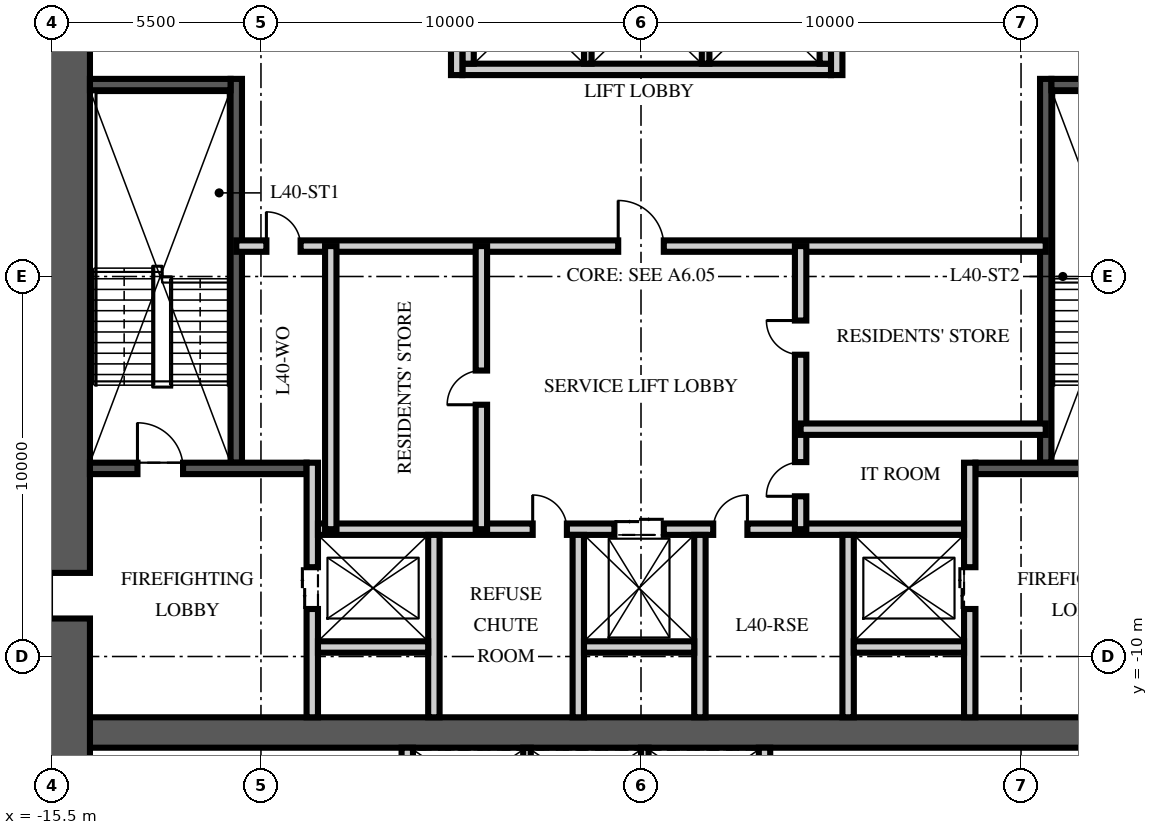
"""IFC4 building model, lengths in metres.
Left out: names, types, materials, properties, quantities, classifications, styles, units other than length and angle.
Written with IfcOpenShell. Run it as: python <this file> out.ifc"""

import sys

from ifc_helpers import new_model, si_unit, direction, frame, frame_2d, origin, place, context, subcontext, project, spatial, rectangle, extrude, element, fill, save


model = new_model("IFC4")
c1 = context("Model", 3, precision=1e-05, world=origin(), true_north=direction((0.0, 1.0)))
c2 = subcontext(c1, "Body", "Model", "MODEL_VIEW")
j1 = project(units=[si_unit("LENGTHUNIT", "METRE"), si_unit("PLANEANGLEUNIT", "RADIAN")], contexts=[c1])
p1 = place(None, origin())
s1 = spatial("IfcSite", under=j1, at=p1, CompositionType="ELEMENT")
p2 = place(p1, origin())
s2 = spatial("IfcBuilding", under=s1, at=p2, CompositionType="ELEMENT")
p3 = place(p2, frame((0.0, 0.0, 159.75)))
s3 = spatial("IfcBuildingStorey", under=s2, at=p3, CompositionType="ELEMENT", Elevation=159.75)
p4 = place(p3, frame((-15.5, -12.0, -0.25), z_axis=(0.0, 0.0, 1.0), x_axis=(1.0, 0.0, 0.0)))
e1 = element("IfcWall", 1, at=p4, inside=s3, PredefinedType="SHEAR", context=c2, shape_type="SweptSolid", body=[
    extrude(rectangle(XDim=31.0, YDim=0.8, at=frame_2d((15.5, 0.0))), origin(), (0.0, 0.0, 1.0), 3.75),
])
p5 = place(p3, frame((-15.5, -15.5, -0.25), z_axis=(0.0, 0.0, 1.0), x_axis=(0.0, 1.0, 0.0)))
e2 = element("IfcWall", 2, at=p5, inside=s3, PredefinedType="SHEAR", context=c2, shape_type="SweptSolid", body=[
    extrude(rectangle(XDim=31.0, YDim=2.0, at=frame_2d((15.5, 0.0))), origin(), (0.0, 0.0, 1.0), 3.75),
])
p6 = place(p5, frame((6.5, 0.0, 0.25)))
e3 = element("IfcOpeningElement", 3, at=p6, cuts=e2, PredefinedType="OPENING", context=c2, shape_type="SweptSolid", body=[
    extrude(rectangle(XDim=1.2, YDim=2.1, at=frame_2d((0.6, 1.05))), frame((0.0, 1.01, 0.0), z_axis=(0.0, -1.0, 0.0), x_axis=(1.0, 0.0, 0.0)), (0.0, 0.0, 1.0), 2.02),
])
p7 = place(p5, frame((23.0, 0.0, 0.25)))
e4 = element("IfcOpeningElement", 4, at=p7, cuts=e2, PredefinedType="OPENING", context=c2, shape_type="SweptSolid", body=[
    extrude(rectangle(XDim=1.8, YDim=2.1, at=frame_2d((0.9, 1.05))), frame((0.0, 1.01, 0.0), z_axis=(0.0, -1.0, 0.0), x_axis=(1.0, 0.0, 0.0)), (0.0, 0.0, 1.0), 2.02),
])
p8 = place(p3, frame((-10.65, -4.9, 0.0), z_axis=(0.0, 0.0, 1.0), x_axis=(0.0, 1.0, 0.0)))
e5 = element("IfcWall", 5, at=p8, inside=s3, PredefinedType="SOLIDWALL", context=c2, shape_type="SweptSolid", body=[
    extrude(rectangle(XDim=10.1, YDim=0.3, at=frame_2d((5.05, 0.0))), origin(), (0.0, 0.0, 1.0), 3.5),
])
p9 = place(p3, frame((-14.5, -5.05, 0.0), z_axis=(0.0, 0.0, 1.0), x_axis=(1.0, 0.0, 0.0)))
e6 = element("IfcWall", 6, at=p9, inside=s3, PredefinedType="SOLIDWALL", context=c2, shape_type="SweptSolid", body=[
    extrude(rectangle(XDim=5.7, YDim=0.3, at=frame_2d((2.85, 0.0))), origin(), (0.0, 0.0, 1.0), 3.5),
])
p10 = place(p9, frame((1.25, 0.0, 0.0)))
e7 = element("IfcOpeningElement", 7, at=p10, cuts=e6, PredefinedType="OPENING", context=c2, shape_type="SweptSolid", body=[
    extrude(rectangle(XDim=1.2, YDim=2.1, at=frame_2d((0.6, 1.05))), frame((0.0, 0.16, 0.0), z_axis=(0.0, -1.0, 0.0), x_axis=(1.0, 0.0, 0.0)), (0.0, 0.0, 1.0), 0.32),
])
p11 = place(p3, frame((-14.5, 5.05, 0.0), z_axis=(0.0, 0.0, 1.0), x_axis=(1.0, 0.0, 0.0)))
e8 = element("IfcWall", 8, at=p11, inside=s3, PredefinedType="SOLIDWALL", context=c2, shape_type="SweptSolid", body=[
    extrude(rectangle(XDim=3.7, YDim=0.3, at=frame_2d((1.85, 0.0))), origin(), (0.0, 0.0, 1.0), 3.5),
])
p12 = place(p3, frame((-8.65, -11.6, 0.0), z_axis=(0.0, 0.0, 1.0), x_axis=(0.0, 1.0, 0.0)))
e9 = element("IfcWall", 9, at=p12, inside=s3, PredefinedType="PARTITIONING", context=c2, shape_type="SweptSolid", body=[
    extrude(rectangle(XDim=6.7, YDim=0.3, at=frame_2d((3.35, 0.0))), origin(), (0.0, 0.0, 1.0), 3.5),
])
p13 = place(p12, frame((2.85, 0.0, 0.0)))
e10 = element("IfcOpeningElement", 10, at=p13, cuts=e9, PredefinedType="OPENING", context=c2, shape_type="SweptSolid", body=[
    extrude(rectangle(XDim=1.1, YDim=2.1, at=frame_2d((0.55, 1.05))), frame((0.0, 0.16, 0.0), z_axis=(0.0, -1.0, 0.0), x_axis=(1.0, 0.0, 0.0)), (0.0, 0.0, 1.0), 0.32),
])
p14 = place(p3, frame((10.65, -4.9, 0.0), z_axis=(0.0, 0.0, 1.0), x_axis=(0.0, 1.0, 0.0)))
e11 = element("IfcWall", 11, at=p14, inside=s3, PredefinedType="SOLIDWALL", context=c2, shape_type="SweptSolid", body=[
    extrude(rectangle(XDim=10.1, YDim=0.3, at=frame_2d((5.05, 0.0))), origin(), (0.0, 0.0, 1.0), 3.5),
])
p15 = place(p3, frame((14.5, -5.05, 0.0), z_axis=(0.0, 0.0, 1.0), x_axis=(-1.0, 0.0, 0.0)))
e12 = element("IfcWall", 12, at=p15, inside=s3, PredefinedType="SOLIDWALL", context=c2, shape_type="SweptSolid", body=[
    extrude(rectangle(XDim=5.7, YDim=0.3, at=frame_2d((2.85, 0.0))), origin(), (0.0, 0.0, 1.0), 3.5),
])
p16 = place(p15, frame((1.25, 0.0, 0.0)))
e13 = element("IfcOpeningElement", 13, at=p16, cuts=e12, PredefinedType="OPENING", context=c2, shape_type="SweptSolid", body=[
    extrude(rectangle(XDim=1.2, YDim=2.1, at=frame_2d((0.6, 1.05))), frame((0.0, 0.16, 0.0), z_axis=(0.0, -1.0, 0.0), x_axis=(1.0, 0.0, 0.0)), (0.0, 0.0, 1.0), 0.32),
])
p17 = place(p3, frame((14.5, 5.05, 0.0), z_axis=(0.0, 0.0, 1.0), x_axis=(-1.0, 0.0, 0.0)))
e14 = element("IfcWall", 14, at=p17, inside=s3, PredefinedType="SOLIDWALL", context=c2, shape_type="SweptSolid", body=[
    extrude(rectangle(XDim=3.7, YDim=0.3, at=frame_2d((1.85, 0.0))), origin(), (0.0, 0.0, 1.0), 3.5),
])
p18 = place(p3, frame((8.65, -11.6, 0.0), z_axis=(0.0, 0.0, 1.0), x_axis=(0.0, 1.0, 0.0)))
e15 = element("IfcWall", 15, at=p18, inside=s3, PredefinedType="PARTITIONING", context=c2, shape_type="SweptSolid", body=[
    extrude(rectangle(XDim=6.7, YDim=0.3, at=frame_2d((3.35, 0.0))), origin(), (0.0, 0.0, 1.0), 3.5),
])
p19 = place(p18, frame((2.85, 0.0, 0.0)))
e16 = element("IfcOpeningElement", 16, at=p19, cuts=e15, PredefinedType="OPENING", context=c2, shape_type="SweptSolid", body=[
    extrude(rectangle(XDim=1.1, YDim=2.1, at=frame_2d((0.55, 1.05))), frame((0.0, 0.16, 0.0), z_axis=(0.0, -1.0, 0.0), x_axis=(1.0, 0.0, 0.0)), (0.0, 0.0, 1.0), 0.32),
])
p20 = place(p3, frame((-8.5, -6.65, 0.0), z_axis=(0.0, 0.0, 1.0), x_axis=(1.0, 0.0, 0.0)))
e17 = element("IfcWall", 17, at=p20, inside=s3, PredefinedType="PARTITIONING", context=c2, shape_type="SweptSolid", body=[
    extrude(rectangle(XDim=17.0, YDim=0.3, at=frame_2d((8.5, 0.0))), origin(), (0.0, 0.0, 1.0), 3.5),
])
p21 = place(p20, frame((7.8, 0.0, 0.0)))
e18 = element("IfcOpeningElement", 18, at=p21, cuts=e17, PredefinedType="OPENING", context=c2, shape_type="SweptSolid", body=[
    extrude(rectangle(XDim=1.3, YDim=2.4, at=frame_2d((0.65, 1.2))), frame((0.0, 0.16, 0.0), z_axis=(0.0, -1.0, 0.0), x_axis=(1.0, 0.0, 0.0)), (0.0, 0.0, 1.0), 0.32),
])
p22 = place(p20, frame((5.65, 0.0, 0.0)))
e19 = element("IfcOpeningElement", 19, at=p22, cuts=e17, PredefinedType="OPENING", context=c2, shape_type="SweptSolid", body=[
    extrude(rectangle(XDim=0.9, YDim=2.1, at=frame_2d((0.45, 1.05))), frame((0.0, 0.16, 0.0), z_axis=(0.0, -1.0, 0.0), x_axis=(1.0, 0.0, 0.0)), (0.0, 0.0, 1.0), 0.32),
])
p23 = place(p20, frame((10.4, 0.0, 0.0)))
e20 = element("IfcOpeningElement", 20, at=p23, cuts=e17, PredefinedType="OPENING", context=c2, shape_type="SweptSolid", body=[
    extrude(rectangle(XDim=0.9, YDim=2.1, at=frame_2d((0.45, 1.05))), frame((0.0, 0.16, 0.0), z_axis=(0.0, -1.0, 0.0), x_axis=(1.0, 0.0, 0.0)), (0.0, 0.0, 1.0), 0.32),
])
for number, where, z_axis, x_axis in (
    (21, (-5.45, -11.6, 0.0), (0.0, 0.0, 1.0), (0.0, 1.0, 0.0)),
    (22, (-1.65, -11.6, 0.0), (0.0, 0.0, 1.0), (0.0, 1.0, 0.0)),
    (23, (1.55, -11.6, 0.0), (0.0, 0.0, 1.0), (0.0, 1.0, 0.0)),
    (24, (5.45, -11.6, 0.0), (0.0, 0.0, 1.0), (0.0, 1.0, 0.0)),
):
    element("IfcWall", number, at=place(p3, frame(where, z_axis=z_axis, x_axis=x_axis)), inside=s3, PredefinedType="PARTITIONING", context=c2, shape_type="SweptSolid", body=[
        extrude(rectangle(XDim=4.8, YDim=0.3, at=frame_2d((2.4, 0.0))), origin(), (0.0, 0.0, 1.0), 3.5),
    ])
for number, where, z_axis, x_axis in (
    (25, (-8.5, -9.75, 0.0), (0.0, 0.0, 1.0), (1.0, 0.0, 0.0)),
    (26, (-1.5, -9.75, 0.0), (0.0, 0.0, 1.0), (1.0, 0.0, 0.0)),
    (27, (5.6, -9.75, 0.0), (0.0, 0.0, 1.0), (1.0, 0.0, 0.0)),
):
    element("IfcWall", number, at=place(p3, frame(where, z_axis=z_axis, x_axis=x_axis)), inside=s3, PredefinedType="PARTITIONING", context=c2, shape_type="SweptSolid", body=[
        extrude(rectangle(XDim=2.9, YDim=0.3, at=frame_2d((1.45, 0.0))), origin(), (0.0, 0.0, 1.0), 3.5),
    ])
p24 = place(p3, frame((-4.7, 5.45, 0.0), z_axis=(0.0, 0.0, 1.0), x_axis=(1.0, 0.0, 0.0)))
e28 = element("IfcWall", 28, at=p24, inside=s3, PredefinedType="PARTITIONING", context=c2, shape_type="SweptSolid", body=[
    extrude(rectangle(XDim=9.7, YDim=0.3, at=frame_2d((4.85, 0.0))), origin(), (0.0, 0.0, 1.0), 3.5),
])
for number, where, z_axis, x_axis in (
    (29, (-4.55, 5.6, 0.0), (0.0, 0.0, 1.0), (0.0, 1.0, 0.0)),
    (30, (4.85, 5.6, 0.0), (0.0, 0.0, 1.0), (0.0, 1.0, 0.0)),
):
    element("IfcWall", number, at=place(p3, frame(where, z_axis=z_axis, x_axis=x_axis)), inside=s3, PredefinedType="PARTITIONING", context=c2, shape_type="SweptSolid", body=[
        extrude(rectangle(XDim=2.8, YDim=0.3, at=frame_2d((1.4, 0.0))), origin(), (0.0, 0.0, 1.0), 3.5),
    ])
for number, where, z_axis, x_axis in (
    (31, (-1.4, 5.6, 0.0), (0.0, 0.0, 1.0), (0.0, 1.0, 0.0)),
    (32, (1.7, 5.6, 0.0), (0.0, 0.0, 1.0), (0.0, 1.0, 0.0)),
):
    element("IfcWall", number, at=place(p3, frame(where, z_axis=z_axis, x_axis=x_axis)), inside=s3, PredefinedType="PARTITIONING", context=c2, shape_type="SweptSolid", body=[
        extrude(rectangle(XDim=2.8, YDim=0.2, at=frame_2d((1.4, 0.0))), origin(), (0.0, 0.0, 1.0), 3.5),
    ])
for number, where, z_axis, x_axis in (
    (33, (-6.15, -14.5, 0.0), (0.0, 0.0, 1.0), (0.0, 1.0, 0.0)),
    (34, (3.25, -14.5, 0.0), (0.0, 0.0, 1.0), (0.0, 1.0, 0.0)),
):
    element("IfcWall", number, at=place(p3, frame(where, z_axis=z_axis, x_axis=x_axis)), inside=s3, PredefinedType="PARTITIONING", context=c2, shape_type="SweptSolid", body=[
        extrude(rectangle(XDim=2.1, YDim=0.3, at=frame_2d((1.05, 0.0))), origin(), (0.0, 0.0, 1.0), 3.5),
    ])
for number, where, z_axis, x_axis in (
    (35, (-3.0, -14.5, 0.0), (0.0, 0.0, 1.0), (0.0, 1.0, 0.0)),
    (36, (0.1, -14.5, 0.0), (0.0, 0.0, 1.0), (0.0, 1.0, 0.0)),
):
    element("IfcWall", number, at=place(p3, frame(where, z_axis=z_axis, x_axis=x_axis)), inside=s3, PredefinedType="PARTITIONING", context=c2, shape_type="SweptSolid", body=[
        extrude(rectangle(XDim=2.1, YDim=0.2, at=frame_2d((1.05, 0.0))), origin(), (0.0, 0.0, 1.0), 3.5),
    ])
p25 = place(p3, frame((-10.65, 0.8, 0.0), z_axis=(0.0, 0.0, 1.0), x_axis=(1.0, 0.0, 0.0)))
e37 = element("IfcWall", 37, at=p25, inside=s3, PredefinedType="PARTITIONING", context=c2, shape_type="SweptSolid", body=[
    extrude(rectangle(XDim=21.3, YDim=0.3, at=frame_2d((10.65, 0.0))), origin(), (0.0, 0.0, 1.0), 3.5),
])
p26 = place(p25, frame((10.05, 0.0, 0.0)))
e38 = element("IfcOpeningElement", 38, at=p26, cuts=e37, PredefinedType="OPENING", context=c2, shape_type="SweptSolid", body=[
    extrude(rectangle(XDim=1.2, YDim=2.1, at=frame_2d((0.6, 1.05))), frame((0.0, 0.16, 0.0), z_axis=(0.0, -1.0, 0.0), x_axis=(1.0, 0.0, 0.0)), (0.0, 0.0, 1.0), 0.32),
])
p27 = place(p25, frame((0.793, 0.0, 0.0)))
e39 = element("IfcOpeningElement", 39, at=p27, cuts=e37, PredefinedType="OPENING", context=c2, shape_type="SweptSolid", body=[
    extrude(rectangle(XDim=0.9, YDim=2.1, at=frame_2d((0.45, 1.05))), frame((0.0, 0.16, 0.0), z_axis=(0.0, -1.0, 0.0), x_axis=(1.0, 0.0, 0.0)), (0.0, 0.0, 1.0), 0.32),
])
p28 = place(p3, frame((-4.2, -6.65, 0.0), z_axis=(0.0, 0.0, 1.0), x_axis=(0.0, 1.0, 0.0)))
e40 = element("IfcWall", 40, at=p28, inside=s3, PredefinedType="PARTITIONING", context=c2, shape_type="SweptSolid", body=[
    extrude(rectangle(XDim=7.45, YDim=0.3, at=frame_2d((3.725, 0.0))), origin(), (0.0, 0.0, 1.0), 3.5),
])
p29 = place(p28, frame((3.275, 0.0, 0.0)))
e41 = element("IfcOpeningElement", 41, at=p29, cuts=e40, PredefinedType="OPENING", context=c2, shape_type="SweptSolid", body=[
    extrude(rectangle(XDim=0.9, YDim=2.1, at=frame_2d((0.45, 1.05))), frame((0.0, 0.16, 0.0), z_axis=(0.0, -1.0, 0.0), x_axis=(1.0, 0.0, 0.0)), (0.0, 0.0, 1.0), 0.32),
])
p30 = place(p3, frame((4.2, -6.65, 0.0), z_axis=(0.0, 0.0, 1.0), x_axis=(0.0, 1.0, 0.0)))
e42 = element("IfcWall", 42, at=p30, inside=s3, PredefinedType="PARTITIONING", context=c2, shape_type="SweptSolid", body=[
    extrude(rectangle(XDim=7.45, YDim=0.3, at=frame_2d((3.725, 0.0))), origin(), (0.0, 0.0, 1.0), 3.5),
])
p31 = place(p30, frame((0.866, 0.0, 0.0)))
e43 = element("IfcOpeningElement", 43, at=p31, cuts=e42, PredefinedType="OPENING", context=c2, shape_type="SweptSolid", body=[
    extrude(rectangle(XDim=0.9, YDim=2.1, at=frame_2d((0.45, 1.05))), frame((0.0, 0.16, 0.0), z_axis=(0.0, -1.0, 0.0), x_axis=(1.0, 0.0, 0.0)), (0.0, 0.0, 1.0), 0.32),
])
p32 = place(p30, frame((4.591, 0.0, 0.0)))
e44 = element("IfcOpeningElement", 44, at=p32, cuts=e42, PredefinedType="OPENING", context=c2, shape_type="SweptSolid", body=[
    extrude(rectangle(XDim=0.9, YDim=2.1, at=frame_2d((0.45, 1.05))), frame((0.0, 0.16, 0.0), z_axis=(0.0, -1.0, 0.0), x_axis=(1.0, 0.0, 0.0)), (0.0, 0.0, 1.0), 0.32),
])
p33 = place(p3, frame((-8.163, -6.65, 0.0), z_axis=(0.0, 0.0, 1.0), x_axis=(0.0, 1.0, 0.0)))
e45 = element("IfcWall", 45, at=p33, inside=s3, PredefinedType="PARTITIONING", context=c2, shape_type="SweptSolid", body=[
    extrude(rectangle(XDim=7.45, YDim=0.3, at=frame_2d((3.725, 0.0))), origin(), (0.0, 0.0, 1.0), 3.5),
])
p34 = place(p3, frame((10.65, -4.018, 0.0), z_axis=(0.0, 0.0, 1.0), x_axis=(-1.0, 0.0, 0.0)))
e46 = element("IfcWall", 46, at=p34, inside=s3, PredefinedType="PARTITIONING", context=c2, shape_type="SweptSolid", body=[
    extrude(rectangle(XDim=6.45, YDim=0.3, at=frame_2d((3.225, 0.0))), origin(), (0.0, 0.0, 1.0), 3.5),
])
p35 = place(p3, frame((-4.85, 5.3, 0.0), z_axis=(0.0, 0.0, 1.0), x_axis=(0.0, 1.0, 0.0)))
e47 = element("IfcWall", 47, at=p35, inside=s3, PredefinedType="PARTITIONING", context=c2, shape_type="SweptSolid", body=[
    extrude(rectangle(XDim=6.3, YDim=0.3, at=frame_2d((3.15, 0.0))), origin(), (0.0, 0.0, 1.0), 3.5),
])
p36 = place(p35, frame((4.35, 0.0, 0.0)))
e48 = element("IfcOpeningElement", 48, at=p36, cuts=e47, PredefinedType="OPENING", context=c2, shape_type="SweptSolid", body=[
    extrude(rectangle(XDim=0.9, YDim=2.1, at=frame_2d((0.45, 1.05))), frame((0.0, 0.16, 0.0), z_axis=(0.0, -1.0, 0.0), x_axis=(1.0, 0.0, 0.0)), (0.0, 0.0, 1.0), 0.32),
])
p37 = place(p3, frame((5.15, 5.3, 0.0), z_axis=(0.0, 0.0, 1.0), x_axis=(0.0, 1.0, 0.0)))
e49 = element("IfcWall", 49, at=p37, inside=s3, PredefinedType="PARTITIONING", context=c2, shape_type="SweptSolid", body=[
    extrude(rectangle(XDim=6.3, YDim=0.3, at=frame_2d((3.15, 0.0))), origin(), (0.0, 0.0, 1.0), 3.5),
])
p38 = place(p37, frame((4.35, 0.0, 0.0)))
e50 = element("IfcOpeningElement", 50, at=p38, cuts=e49, PredefinedType="OPENING", context=c2, shape_type="SweptSolid", body=[
    extrude(rectangle(XDim=0.9, YDim=2.1, at=frame_2d((0.45, 1.05))), frame((0.0, 0.16, 0.0), z_axis=(0.0, -1.0, 0.0), x_axis=(1.0, 0.0, 0.0)), (0.0, 0.0, 1.0), 0.32),
])
p39 = place(p10, origin())
e51 = element("IfcDoor", 51, at=p39, inside=s3, OperationType="SINGLE_SWING_LEFT", PredefinedType="DOOR", context=c2, shape_type="SweptSolid", body=[
    extrude(rectangle(XDim=1.2, YDim=2.1, at=frame_2d((0.6, 1.05))), frame((0.0, 0.025, 0.0), z_axis=(0.0, -1.0, 0.0), x_axis=(1.0, 0.0, 0.0)), (0.0, 0.0, 1.0), 0.05),
])
fill(e7, e51)
p40 = place(p6, origin())
e52 = element("IfcDoor", 52, at=p40, inside=s3, OperationType="SINGLE_SWING_LEFT", PredefinedType="DOOR", context=c2, shape_type="SweptSolid", body=[
    extrude(rectangle(XDim=1.2, YDim=2.1, at=frame_2d((0.6, 1.05))), frame((0.0, 0.025, 0.0), z_axis=(0.0, -1.0, 0.0), x_axis=(1.0, 0.0, 0.0)), (0.0, 0.0, 1.0), 0.05),
])
fill(e3, e52)
p41 = place(p13, origin())
e53 = element("IfcDoor", 53, at=p41, inside=s3, OperationType="DOUBLE_DOOR_SLIDING", PredefinedType="DOOR", context=c2, shape_type="SweptSolid", body=[
    extrude(rectangle(XDim=1.1, YDim=2.1, at=frame_2d((0.55, 1.05))), frame((0.0, 0.025, 0.0), z_axis=(0.0, -1.0, 0.0), x_axis=(1.0, 0.0, 0.0)), (0.0, 0.0, 1.0), 0.05),
])
fill(e10, e53)
p42 = place(p19, origin())
e54 = element("IfcDoor", 54, at=p42, inside=s3, OperationType="DOUBLE_DOOR_SLIDING", PredefinedType="DOOR", context=c2, shape_type="SweptSolid", body=[
    extrude(rectangle(XDim=1.1, YDim=2.1, at=frame_2d((0.55, 1.05))), frame((0.0, 0.025, 0.0), z_axis=(0.0, -1.0, 0.0), x_axis=(1.0, 0.0, 0.0)), (0.0, 0.0, 1.0), 0.05),
])
fill(e16, e54)
p43 = place(p21, origin())
e55 = element("IfcDoor", 55, at=p43, inside=s3, OperationType="DOUBLE_DOOR_SLIDING", PredefinedType="DOOR", context=c2, shape_type="SweptSolid", body=[
    extrude(rectangle(XDim=1.3, YDim=2.4, at=frame_2d((0.65, 1.2))), frame((0.0, 0.025, 0.0), z_axis=(0.0, -1.0, 0.0), x_axis=(1.0, 0.0, 0.0)), (0.0, 0.0, 1.0), 0.05),
])
fill(e18, e55)
p44 = place(p26, origin())
e56 = element("IfcDoor", 56, at=p44, inside=s3, OperationType="SINGLE_SWING_LEFT", PredefinedType="DOOR", context=c2, shape_type="SweptSolid", body=[
    extrude(rectangle(XDim=1.2, YDim=2.1, at=frame_2d((0.6, 1.05))), frame((0.0, 0.025, 0.0), z_axis=(0.0, -1.0, 0.0), x_axis=(1.0, 0.0, 0.0)), (0.0, 0.0, 1.0), 0.05),
])
fill(e38, e56)
p45 = place(p22, origin())
e57 = element("IfcDoor", 57, at=p45, inside=s3, OperationType="SINGLE_SWING_LEFT", PredefinedType="DOOR", context=c2, shape_type="SweptSolid", body=[
    extrude(rectangle(XDim=0.9, YDim=2.1, at=frame_2d((0.45, 1.05))), frame((0.0, 0.025, 0.0), z_axis=(0.0, -1.0, 0.0), x_axis=(1.0, 0.0, 0.0)), (0.0, 0.0, 1.0), 0.05),
])
fill(e19, e57)
p46 = place(p23, origin())
e58 = element("IfcDoor", 58, at=p46, inside=s3, OperationType="SINGLE_SWING_RIGHT", PredefinedType="DOOR", context=c2, shape_type="SweptSolid", body=[
    extrude(rectangle(XDim=0.9, YDim=2.1, at=frame_2d((0.45, 1.05))), frame((0.0, 0.025, 0.0), z_axis=(0.0, -1.0, 0.0), x_axis=(1.0, 0.0, 0.0)), (0.0, 0.0, 1.0), 0.05),
])
fill(e20, e58)
p47 = place(p29, origin())
e59 = element("IfcDoor", 59, at=p47, inside=s3, OperationType="SINGLE_SWING_LEFT", PredefinedType="DOOR", context=c2, shape_type="SweptSolid", body=[
    extrude(rectangle(XDim=0.9, YDim=2.1, at=frame_2d((0.45, 1.05))), frame((0.0, 0.025, 0.0), z_axis=(0.0, -1.0, 0.0), x_axis=(1.0, 0.0, 0.0)), (0.0, 0.0, 1.0), 0.05),
])
fill(e41, e59)
p48 = place(p27, origin())
e60 = element("IfcDoor", 60, at=p48, inside=s3, OperationType="SINGLE_SWING_LEFT", PredefinedType="DOOR", context=c2, shape_type="SweptSolid", body=[
    extrude(rectangle(XDim=0.9, YDim=2.1, at=frame_2d((0.45, 1.05))), frame((0.0, 0.025, 0.0), z_axis=(0.0, -1.0, 0.0), x_axis=(1.0, 0.0, 0.0)), (0.0, 0.0, 1.0), 0.05),
])
fill(e39, e60)
p49 = place(p31, origin())
e61 = element("IfcDoor", 61, at=p49, inside=s3, OperationType="SINGLE_SWING_LEFT", PredefinedType="DOOR", context=c2, shape_type="SweptSolid", body=[
    extrude(rectangle(XDim=0.9, YDim=2.1, at=frame_2d((0.45, 1.05))), frame((0.0, 0.025, 0.0), z_axis=(0.0, -1.0, 0.0), x_axis=(1.0, 0.0, 0.0)), (0.0, 0.0, 1.0), 0.05),
])
fill(e43, e61)
p50 = place(p32, origin())
e62 = element("IfcDoor", 62, at=p50, inside=s3, OperationType="SINGLE_SWING_RIGHT", PredefinedType="DOOR", context=c2, shape_type="SweptSolid", body=[
    extrude(rectangle(XDim=0.9, YDim=2.1, at=frame_2d((0.45, 1.05))), frame((0.0, 0.025, 0.0), z_axis=(0.0, -1.0, 0.0), x_axis=(1.0, 0.0, 0.0)), (0.0, 0.0, 1.0), 0.05),
])
fill(e44, e62)
save(model, sys.argv[1])
